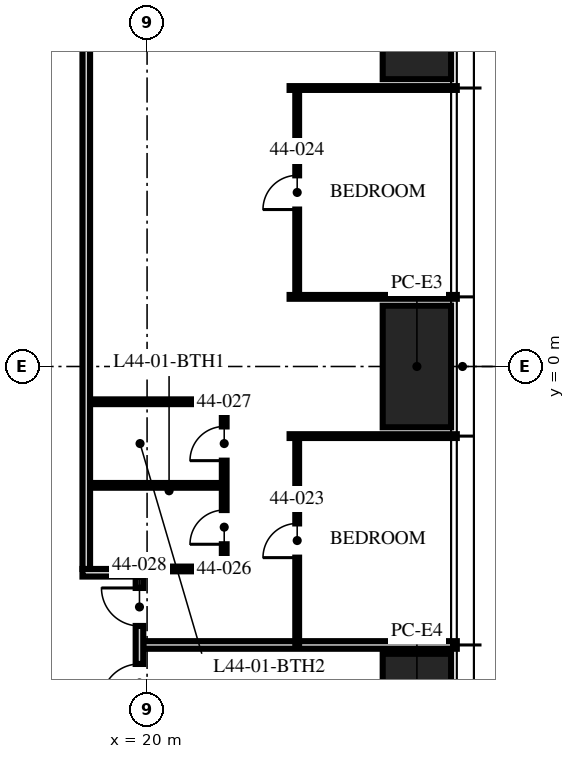
"""IFC4 building model, lengths in metres.
Left out: names, types, materials, properties, quantities, classifications, styles, units other than length and angle.
Written with IfcOpenShell. Run it as: python <this file> out.ifc"""

import sys

from ifc_helpers import new_model, si_unit, direction, frame, frame_2d, origin, origin_2d, place, context, subcontext, project, spatial, rectangle, hollow_rectangle, extrude, element, fill, save


model = new_model("IFC4")
c1 = context("Model", 3, precision=1e-05, world=origin(), true_north=direction((0.0, 1.0)))
c2 = subcontext(c1, "Body", "Model", "MODEL_VIEW")
j1 = project(units=[si_unit("LENGTHUNIT", "METRE"), si_unit("PLANEANGLEUNIT", "RADIAN")], contexts=[c1])
p1 = place(None, origin())
s1 = spatial("IfcSite", under=j1, at=p1, CompositionType="ELEMENT")
p2 = place(p1, origin())
s2 = spatial("IfcBuilding", under=s1, at=p2, CompositionType="ELEMENT")
p3 = place(p2, frame((0.0, 0.0, 174.75)))
s3 = spatial("IfcBuildingStorey", under=s2, at=p3, CompositionType="ELEMENT", Elevation=174.75)
for number, where, z_axis, x_axis in (
    (1, (27.1, 9.16, 0.0), (0.0, 0.0, 1.0), (0.0, 1.0, 0.0)),
    (2, (27.1, 0.0, 0.0), (0.0, 0.0, 1.0), (0.0, 1.0, 0.0)),
    (3, (27.1, -9.16, 0.0), (0.0, 0.0, 1.0), (0.0, 1.0, 0.0)),
):
    element("IfcColumn", number, at=place(p3, frame(where, z_axis=z_axis, x_axis=x_axis)), inside=s3, PredefinedType="COLUMN", context=c2, shape_type="SweptSolid", body=[
        extrude(hollow_rectangle(XDim=3.2, YDim=1.8, WallThickness=0.2, at=origin_2d()), origin(), (0.0, 0.0, 1.0), 3.75),
    ])
p4 = place(p3, frame((19.9, -7.328, 0.0), z_axis=(0.0, 0.0, 1.0), x_axis=(1.0, 0.0, 0.0)))
e4 = element("IfcWall", 4, at=p4, inside=s3, PredefinedType="PARTITIONING", context=c2, shape_type="SweptSolid", body=[
    extrude(rectangle(XDim=8.25, YDim=0.2, at=frame_2d((4.125, 0.0))), origin(), (0.0, 0.0, 1.0), 2.81),
])
for number, where, z_axis, x_axis in (
    (5, (23.75, -1.832, 0.0), (0.0, 0.0, 1.0), (1.0, 0.0, 0.0)),
    (6, (23.75, 1.832, 0.0), (0.0, 0.0, 1.0), (1.0, 0.0, 0.0)),
    (7, (23.75, 7.328, 0.0), (0.0, 0.0, 1.0), (1.0, 0.0, 0.0)),
):
    element("IfcWall", number, at=place(p3, frame(where, z_axis=z_axis, x_axis=x_axis)), inside=s3, PredefinedType="PARTITIONING", context=c2, shape_type="SweptSolid", body=[
        extrude(rectangle(XDim=4.4, YDim=0.1, at=frame_2d((2.2, 0.0))), origin(), (0.0, 0.0, 1.0), 2.81),
    ])
p5 = place(p3, frame((23.95, -7.328, 0.0), z_axis=(0.0, 0.0, 1.0), x_axis=(0.0, 1.0, 0.0)))
e8 = element("IfcWall", 8, at=p5, inside=s3, PredefinedType="PARTITIONING", context=c2, shape_type="SweptSolid", body=[
    extrude(rectangle(XDim=5.496, YDim=0.1, at=frame_2d((2.748, 0.0))), origin(), (0.0, 0.0, 1.0), 2.81),
])
p6 = place(p5, frame((2.298, 0.0, 0.0)))
e9 = element("IfcOpeningElement", 9, at=p6, cuts=e8, PredefinedType="OPENING", context=c2, shape_type="SweptSolid", body=[
    extrude(rectangle(XDim=0.9, YDim=2.1, at=frame_2d((0.45, 1.05))), frame((0.0, 0.06, 0.0), z_axis=(0.0, -1.0, 0.0), x_axis=(1.0, 0.0, 0.0)), (0.0, 0.0, 1.0), 0.12),
])
p7 = place(p3, frame((23.95, 1.832, 0.0), z_axis=(0.0, 0.0, 1.0), x_axis=(0.0, 1.0, 0.0)))
e10 = element("IfcWall", 10, at=p7, inside=s3, PredefinedType="PARTITIONING", context=c2, shape_type="SweptSolid", body=[
    extrude(rectangle(XDim=5.496, YDim=0.1, at=frame_2d((2.748, 0.0))), origin(), (0.0, 0.0, 1.0), 2.81),
])
p8 = place(p7, frame((2.298, 0.0, 0.0)))
e11 = element("IfcOpeningElement", 11, at=p8, cuts=e10, PredefinedType="OPENING", context=c2, shape_type="SweptSolid", body=[
    extrude(rectangle(XDim=0.9, YDim=2.1, at=frame_2d((0.45, 1.05))), frame((0.0, 0.06, 0.0), z_axis=(0.0, -1.0, 0.0), x_axis=(1.0, 0.0, 0.0)), (0.0, 0.0, 1.0), 0.12),
])
p9 = place(p3, frame((22.03, -5.328, 0.0), z_axis=(0.0, 0.0, 1.0), x_axis=(0.0, 1.0, 0.0)))
e12 = element("IfcWall", 12, at=p9, inside=s3, PredefinedType="PARTITIONING", context=c2, shape_type="SweptSolid", body=[
    extrude(rectangle(XDim=4.4, YDim=0.125, at=frame_2d((2.2, 0.0))), origin(), (0.0, 0.0, 1.0), 2.81),
])
p10 = place(p9, frame((0.65, 0.0, 0.0)))
e13 = element("IfcOpeningElement", 13, at=p10, cuts=e12, PredefinedType="OPENING", context=c2, shape_type="SweptSolid", body=[
    extrude(rectangle(XDim=0.9, YDim=2.1, at=frame_2d((0.45, 1.05))), frame((0.0, 0.073, 0.0), z_axis=(0.0, -1.0, 0.0), x_axis=(1.0, 0.0, 0.0)), (0.0, 0.0, 1.0), 0.145),
])
p11 = place(p9, frame((2.85, 0.0, 0.0)))
e14 = element("IfcOpeningElement", 14, at=p11, cuts=e12, PredefinedType="OPENING", context=c2, shape_type="SweptSolid", body=[
    extrude(rectangle(XDim=0.9, YDim=2.1, at=frame_2d((0.45, 1.05))), frame((0.0, 0.073, 0.0), z_axis=(0.0, -1.0, 0.0), x_axis=(1.0, 0.0, 0.0)), (0.0, 0.0, 1.0), 0.145),
])
p12 = place(p3, frame((19.97, -5.328, 0.0), z_axis=(0.0, 0.0, 1.0), x_axis=(1.0, 0.0, 0.0)))
e15 = element("IfcWall", 15, at=p12, inside=s3, PredefinedType="PARTITIONING", context=c2, shape_type="SweptSolid", body=[
    extrude(rectangle(XDim=2.06, YDim=0.125, at=frame_2d((1.03, 0.0))), origin(), (0.0, 0.0, 1.0), 3.5),
])
for number, where, z_axis, x_axis in (
    (16, (18.5, -3.128, 0.0), (0.0, 0.0, 1.0), (1.0, 0.0, 0.0)),
    (17, (18.5, -0.928, 0.0), (0.0, 0.0, 1.0), (1.0, 0.0, 0.0)),
):
    element("IfcWall", number, at=place(p3, frame(where, z_axis=z_axis, x_axis=x_axis)), inside=s3, PredefinedType="PARTITIONING", context=c2, shape_type="SweptSolid", body=[
        extrude(rectangle(XDim=3.53, YDim=0.125, at=frame_2d((1.765, 0.0))), origin(), (0.0, 0.0, 1.0), 3.5),
    ])
p13 = place(p3, frame((18.3, -5.428, 0.0), z_axis=(0.0, 0.0, 1.0), x_axis=(1.0, 0.0, 0.0)))
e18 = element("IfcWall", 18, at=p13, inside=s3, PredefinedType="PARTITIONING", context=c2, shape_type="SweptSolid", body=[
    extrude(rectangle(XDim=1.6, YDim=0.2, at=frame_2d((0.8, 0.0))), origin(), (0.0, 0.0, 1.0), 3.5),
])
p14 = place(p3, frame((19.8, -9.128, 0.0), z_axis=(0.0, 0.0, 1.0), x_axis=(0.0, 1.0, 0.0)))
e19 = element("IfcWall", 19, at=p14, inside=s3, PredefinedType="PARTITIONING", context=c2, shape_type="SweptSolid", body=[
    extrude(rectangle(XDim=3.6, YDim=0.2, at=frame_2d((1.8, 0.0))), origin(), (0.0, 0.0, 1.0), 2.7),
])
p15 = place(p14, frame((2.3, 0.0, 0.0)))
e20 = element("IfcOpeningElement", 20, at=p15, cuts=e19, PredefinedType="OPENING", context=c2, shape_type="SweptSolid", body=[
    extrude(rectangle(XDim=1.0, YDim=2.2, at=frame_2d((0.5, 1.1))), frame((0.0, 0.11, 0.0), z_axis=(0.0, -1.0, 0.0), x_axis=(1.0, 0.0, 0.0)), (0.0, 0.0, 1.0), 0.22),
])
p16 = place(p14, frame((0.3, 0.0, 0.0)))
e21 = element("IfcOpeningElement", 21, at=p16, cuts=e19, PredefinedType="OPENING", context=c2, shape_type="SweptSolid", body=[
    extrude(rectangle(XDim=1.0, YDim=2.2, at=frame_2d((0.5, 1.1))), frame((0.0, 0.11, 0.0), z_axis=(0.0, -1.0, 0.0), x_axis=(1.0, 0.0, 0.0)), (0.0, 0.0, 1.0), 0.22),
])
p17 = place(p3, frame((18.4, -5.328, 0.0), z_axis=(0.0, 0.0, 1.0), x_axis=(0.0, 1.0, 0.0)))
e22 = element("IfcWall", 22, at=p17, inside=s3, PredefinedType="PARTITIONING", context=c2, shape_type="SweptSolid", body=[
    extrude(rectangle(XDim=22.028, YDim=0.2, at=frame_2d((11.014, 0.0))), origin(), (0.0, 0.0, 1.0), 2.7),
])
p18 = place(p6, origin())
e23 = element("IfcDoor", 23, at=p18, inside=s3, OperationType="SINGLE_SWING_LEFT", PredefinedType="DOOR", context=c2, shape_type="SweptSolid", body=[
    extrude(rectangle(XDim=0.9, YDim=2.1, at=frame_2d((0.45, 1.05))), frame((0.0, 0.025, 0.0), z_axis=(0.0, -1.0, 0.0), x_axis=(1.0, 0.0, 0.0)), (0.0, 0.0, 1.0), 0.05),
])
fill(e9, e23)
p19 = place(p8, origin())
e24 = element("IfcDoor", 24, at=p19, inside=s3, OperationType="SINGLE_SWING_LEFT", PredefinedType="DOOR", context=c2, shape_type="SweptSolid", body=[
    extrude(rectangle(XDim=0.9, YDim=2.1, at=frame_2d((0.45, 1.05))), frame((0.0, 0.025, 0.0), z_axis=(0.0, -1.0, 0.0), x_axis=(1.0, 0.0, 0.0)), (0.0, 0.0, 1.0), 0.05),
])
fill(e11, e24)
p20 = place(p10, origin())
e25 = element("IfcDoor", 25, at=p20, inside=s3, OperationType="SINGLE_SWING_LEFT", PredefinedType="DOOR", context=c2, shape_type="SweptSolid", body=[
    extrude(rectangle(XDim=0.9, YDim=2.1, at=frame_2d((0.45, 1.05))), frame((0.0, 0.025, 0.0), z_axis=(0.0, -1.0, 0.0), x_axis=(1.0, 0.0, 0.0)), (0.0, 0.0, 1.0), 0.05),
])
fill(e13, e25)
p21 = place(p11, origin())
e26 = element("IfcDoor", 26, at=p21, inside=s3, OperationType="SINGLE_SWING_LEFT", PredefinedType="DOOR", context=c2, shape_type="SweptSolid", body=[
    extrude(rectangle(XDim=0.9, YDim=2.1, at=frame_2d((0.45, 1.05))), frame((0.0, 0.025, 0.0), z_axis=(0.0, -1.0, 0.0), x_axis=(1.0, 0.0, 0.0)), (0.0, 0.0, 1.0), 0.05),
])
fill(e14, e26)
p22 = place(p15, origin())
e27 = element("IfcDoor", 27, at=p22, inside=s3, OperationType="SINGLE_SWING_RIGHT", PredefinedType="DOOR", context=c2, shape_type="SweptSolid", body=[
    extrude(rectangle(XDim=1.0, YDim=2.2, at=frame_2d((0.5, 1.1))), frame((0.0, 0.025, 0.0), z_axis=(0.0, -1.0, 0.0), x_axis=(1.0, 0.0, 0.0)), (0.0, 0.0, 1.0), 0.05),
])
fill(e20, e27)
p23 = place(p16, origin())
e28 = element("IfcDoor", 28, at=p23, inside=s3, OperationType="SINGLE_SWING_LEFT", PredefinedType="DOOR", context=c2, shape_type="SweptSolid", body=[
    extrude(rectangle(XDim=1.0, YDim=2.2, at=frame_2d((0.5, 1.1))), frame((0.0, 0.025, 0.0), z_axis=(0.0, -1.0, 0.0), x_axis=(1.0, 0.0, 0.0)), (0.0, 0.0, 1.0), 0.05),
])
fill(e21, e28)
save(model, sys.argv[1])
